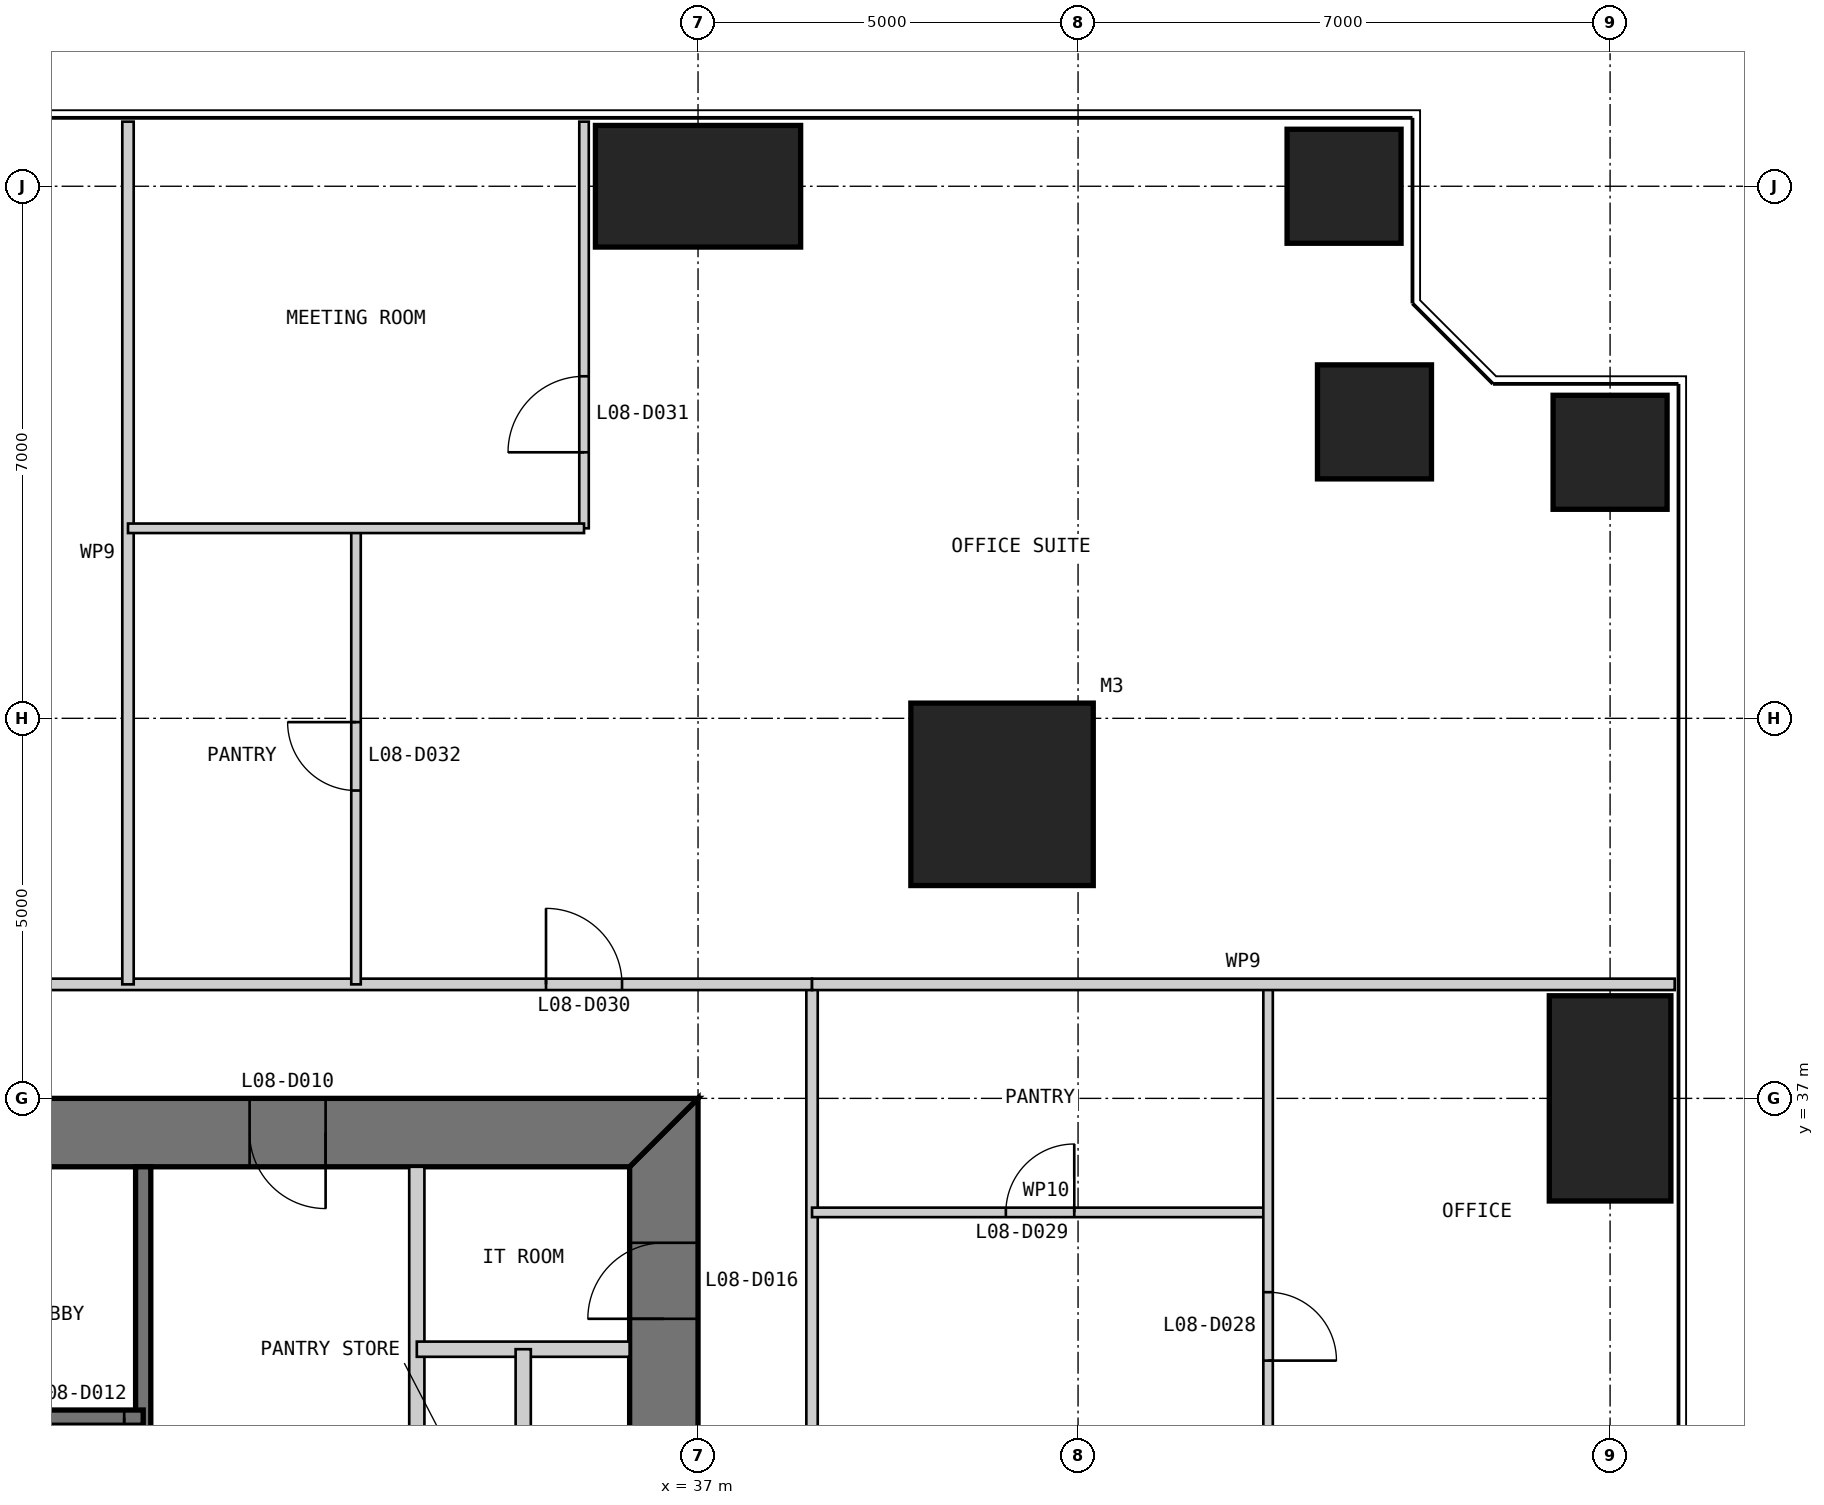
"""IFC4 building model, lengths in metres.
Left out: names, types, materials, properties, quantities, classifications, styles, units other than length and angle.
Written with IfcOpenShell. Run it as: python <this file> out.ifc"""

import sys

from ifc_helpers import new_model, si_unit, direction, frame, frame_2d, origin, origin_2d, place, context, subcontext, project, spatial, polyline, rectangle, outline, extrude, element, fill, save


model = new_model("IFC4")
c1 = context("Model", 3, precision=1e-05, world=origin(), true_north=direction((0.0, 1.0)))
c2 = subcontext(c1, "Body", "Model", "MODEL_VIEW")
j1 = project(units=[si_unit("LENGTHUNIT", "METRE"), si_unit("PLANEANGLEUNIT", "RADIAN")], contexts=[c1])
p1 = place(None, origin())
s1 = spatial("IfcSite", under=j1, at=p1, CompositionType="ELEMENT")
p2 = place(p1, origin())
s2 = spatial("IfcBuilding", under=s1, at=p2, CompositionType="ELEMENT")
p3 = place(p2, frame((0.0, 0.0, 39.0)))
s3 = spatial("IfcBuildingStorey", under=s2, at=p3, CompositionType="ELEMENT", Elevation=39.0)
p4 = place(p3, frame((41.0, 41.0, 0.0), z_axis=(0.0, 0.0, 1.0), x_axis=(1.0, 0.0, 0.0)))
e1 = element("IfcColumn", 1, at=p4, inside=s3, PredefinedType="COLUMN", context=c2, shape_type="SweptSolid", body=[
    extrude(rectangle(XDim=2.4, YDim=2.4, at=origin_2d()), origin(), (0.0, 0.0, 1.0), 4.0),
])
p5 = place(p3, frame((49.0, 37.0, 0.0), z_axis=(0.0, 0.0, 1.0), x_axis=(1.0, 0.0, 0.0)))
e2 = element("IfcColumn", 2, at=p5, inside=s3, PredefinedType="COLUMN", context=c2, shape_type="SweptSolid", body=[
    extrude(rectangle(XDim=1.6, YDim=2.7, at=origin_2d()), origin(), (0.0, 0.0, 1.0), 4.0),
])
for number, where, z_axis, x_axis in (
    (3, (49.0, 45.5, 0.0), (0.0, 0.0, 1.0), (1.0, 0.0, 0.0)),
    (4, (45.9, 45.9, 0.0), (0.0, 0.0, 1.0), (1.0, 0.0, 0.0)),
    (5, (45.5, 49.0, 0.0), (0.0, 0.0, 1.0), (1.0, 0.0, 0.0)),
):
    element("IfcColumn", number, at=place(p3, frame(where, z_axis=z_axis, x_axis=x_axis)), inside=s3, PredefinedType="COLUMN", context=c2, shape_type="SweptSolid", body=[
        extrude(rectangle(XDim=1.5, YDim=1.5, at=origin_2d()), origin(), (0.0, 0.0, 1.0), 4.0),
    ])
p6 = place(p3, frame((37.0, 49.0, 0.0), z_axis=(0.0, 0.0, 1.0), x_axis=(1.0, 0.0, 0.0)))
e6 = element("IfcColumn", 6, at=p6, inside=s3, PredefinedType="COLUMN", context=c2, shape_type="SweptSolid", body=[
    extrude(rectangle(XDim=2.7, YDim=1.6, at=origin_2d()), origin(), (0.0, 0.0, 1.0), 4.0),
])
p7 = place(p3, frame((36.55, 13.9, 0.0), z_axis=(0.0, 0.0, 1.0), x_axis=(0.0, 1.0, 0.0)))
e7 = element("IfcWall", 7, at=p7, inside=s3, PredefinedType="SHEAR", context=c2, shape_type="SweptSolid", body=[
    extrude(outline(polyline([(-0.9, -0.45), (23.1, -0.45), (22.2, 0.45), (0.0, 0.45), (-0.9, -0.45)])), origin(), (0.0, 0.0, 1.0), 4.0),
])
p8 = place(p7, frame((20.2, 0.0, 0.0)))
e8 = element("IfcOpeningElement", 8, at=p8, cuts=e7, PredefinedType="OPENING", context=c2, shape_type="SweptSolid", body=[
    extrude(rectangle(XDim=1.0, YDim=2.2, at=frame_2d((0.5, 1.1))), frame((0.0, 0.46, 0.0), z_axis=(0.0, -1.0, 0.0), x_axis=(1.0, 0.0, 0.0)), (0.0, 0.0, 1.0), 0.92),
])
p9 = place(p7, frame((17.25, 0.0, 0.0)))
e9 = element("IfcOpeningElement", 9, at=p9, cuts=e7, PredefinedType="OPENING", context=c2, shape_type="SweptSolid", body=[
    extrude(rectangle(XDim=0.9, YDim=2.2, at=frame_2d((0.45, 1.1))), frame((0.0, 0.46, 0.0), z_axis=(0.0, -1.0, 0.0), x_axis=(1.0, 0.0, 0.0)), (0.0, 0.0, 1.0), 0.92),
])
p10 = place(p3, frame((37.0, 36.55, 0.0), z_axis=(0.0, 0.0, 1.0), x_axis=(-1.0, 0.0, 0.0)))
e10 = element("IfcWall", 10, at=p10, inside=s3, PredefinedType="SHEAR", context=c2, shape_type="SweptSolid", body=[
    extrude(outline(polyline([(0.0, -0.45), (24.0, -0.45), (23.1, 0.45), (0.9, 0.45), (0.0, -0.45)])), origin(), (0.0, 0.0, 1.0), 4.0),
])
p11 = place(p10, frame((4.9, 0.0, 0.0)))
e11 = element("IfcOpeningElement", 11, at=p11, cuts=e10, PredefinedType="OPENING", context=c2, shape_type="SweptSolid", body=[
    extrude(rectangle(XDim=1.0, YDim=2.2, at=frame_2d((0.5, 1.1))), frame((0.0, 0.46, 0.0), z_axis=(0.0, -1.0, 0.0), x_axis=(1.0, 0.0, 0.0)), (0.0, 0.0, 1.0), 0.92),
])
p12 = place(p10, frame((8.9, 0.0, 0.0)))
e12 = element("IfcOpeningElement", 12, at=p12, cuts=e10, PredefinedType="OPENING", context=c2, shape_type="SweptSolid", body=[
    extrude(rectangle(XDim=1.1, YDim=2.2, at=frame_2d((0.55, 1.1))), frame((0.0, 0.46, 0.0), z_axis=(0.0, -1.0, 0.0), x_axis=(1.0, 0.0, 0.0)), (0.0, 0.0, 1.0), 0.92),
])
p13 = place(p10, frame((15.05, 0.0, 0.0)))
e13 = element("IfcOpeningElement", 13, at=p13, cuts=e10, PredefinedType="OPENING", context=c2, shape_type="SweptSolid", body=[
    extrude(rectangle(XDim=0.9, YDim=2.2, at=frame_2d((0.45, 1.1))), frame((0.0, 0.46, 0.0), z_axis=(0.0, -1.0, 0.0), x_axis=(1.0, 0.0, 0.0)), (0.0, 0.0, 1.0), 0.92),
])
p14 = place(p10, frame((17.9, 0.0, 0.0)))
e14 = element("IfcOpeningElement", 14, at=p14, cuts=e10, PredefinedType="OPENING", context=c2, shape_type="SweptSolid", body=[
    extrude(rectangle(XDim=1.0, YDim=2.2, at=frame_2d((0.5, 1.1))), frame((0.0, 0.46, 0.0), z_axis=(0.0, -1.0, 0.0), x_axis=(1.0, 0.0, 0.0)), (0.0, 0.0, 1.0), 0.92),
])
p15 = place(p10, frame((21.4, 0.0, 0.0)))
e15 = element("IfcOpeningElement", 15, at=p15, cuts=e10, PredefinedType="OPENING", context=c2, shape_type="SweptSolid", body=[
    extrude(rectangle(XDim=1.0, YDim=2.2, at=frame_2d((0.5, 1.1))), frame((0.0, 0.46, 0.0), z_axis=(0.0, -1.0, 0.0), x_axis=(1.0, 0.0, 0.0)), (0.0, 0.0, 1.0), 0.92),
])
p16 = place(p3, frame((33.3, 36.1, 0.0), z_axis=(0.0, 0.0, 1.0), x_axis=(0.0, -1.0, 0.0)))
e16 = element("IfcWall", 16, at=p16, inside=s3, PredefinedType="PARTITIONING", context=c2, shape_type="SweptSolid", body=[
    extrude(rectangle(XDim=16.1, YDim=0.2, at=frame_2d((8.05, 0.0))), origin(), (0.0, 0.0, 1.0), 3.8),
])
p17 = place(p16, frame((3.8, 0.0, 0.0)))
e17 = element("IfcOpeningElement", 17, at=p17, cuts=e16, PredefinedType="OPENING", context=c2, shape_type="SweptSolid", body=[
    extrude(rectangle(XDim=0.9, YDim=2.2, at=frame_2d((0.45, 1.1))), frame((0.0, 0.11, 0.0), z_axis=(0.0, -1.0, 0.0), x_axis=(1.0, 0.0, 0.0)), (0.0, 0.0, 1.0), 0.22),
])
p18 = place(p3, frame((29.7, 36.1, 0.0), z_axis=(0.0, 0.0, 1.0), x_axis=(0.0, -1.0, 0.0)))
e18 = element("IfcWall", 18, at=p18, inside=s3, PredefinedType="SOLIDWALL", context=c2, shape_type="SweptSolid", body=[
    extrude(rectangle(XDim=16.1, YDim=0.2, at=frame_2d((8.05, 0.0))), origin(), (0.0, 0.0, 1.0), 3.8),
])
p19 = place(p3, frame((29.7, 32.8, 0.0), z_axis=(0.0, 0.0, 1.0), x_axis=(-1.0, 0.0, 0.0)))
e19 = element("IfcWall", 19, at=p19, inside=s3, PredefinedType="SOLIDWALL", context=c2, shape_type="SweptSolid", body=[
    extrude(rectangle(XDim=9.4, YDim=0.2, at=frame_2d((4.7, 0.0))), origin(), (0.0, 0.0, 1.0), 3.8),
])
p20 = place(p19, frame((0.25, 0.0, 0.0)))
e20 = element("IfcOpeningElement", 20, at=p20, cuts=e19, PredefinedType="OPENING", context=c2, shape_type="SweptSolid", body=[
    extrude(rectangle(XDim=1.0, YDim=2.2, at=frame_2d((0.5, 1.1))), frame((0.0, 0.11, 0.0), z_axis=(0.0, -1.0, 0.0), x_axis=(1.0, 0.0, 0.0)), (0.0, 0.0, 1.0), 0.22),
])
p21 = place(p3, frame((36.1, 33.7, 0.0), z_axis=(0.0, 0.0, 1.0), x_axis=(-1.0, 0.0, 0.0)))
e21 = element("IfcWall", 21, at=p21, inside=s3, PredefinedType="PARTITIONING", context=c2, shape_type="SweptSolid", body=[
    extrude(rectangle(XDim=2.8, YDim=0.2, at=frame_2d((1.4, 0.0))), origin(), (0.0, 0.0, 1.0), 3.8),
])
p22 = place(p3, frame((34.7, 33.7, 0.0), z_axis=(0.0, 0.0, 1.0), x_axis=(0.0, -1.0, 0.0)))
e22 = element("IfcWall", 22, at=p22, inside=s3, PredefinedType="PARTITIONING", context=c2, shape_type="SweptSolid", body=[
    extrude(rectangle(XDim=3.7, YDim=0.2, at=frame_2d((1.85, 0.0))), origin(), (0.0, 0.0, 1.0), 3.8),
])
p23 = place(p3, frame((38.5, 11.5, 0.0), z_axis=(0.0, 0.0, 1.0), x_axis=(0.0, 1.0, 0.0)))
e23 = element("IfcWall", 23, at=p23, inside=s3, PredefinedType="PARTITIONING", context=c2, shape_type="SweptSolid", body=[
    extrude(rectangle(XDim=27.0, YDim=0.15, at=frame_2d((13.5, 0.0))), origin(), (0.0, 0.0, 1.0), 3.85),
])
p24 = place(p23, frame((11.5, 0.0, 0.0)))
e24 = element("IfcOpeningElement", 24, at=p24, cuts=e23, PredefinedType="OPENING", context=c2, shape_type="SweptSolid", body=[
    extrude(rectangle(XDim=1.0, YDim=2.2, at=frame_2d((0.5, 1.1))), frame((0.0, 0.085, 0.0), z_axis=(0.0, -1.0, 0.0), x_axis=(1.0, 0.0, 0.0)), (0.0, 0.0, 1.0), 0.17),
])
p25 = place(p3, frame((44.5, 35.5, 0.0), z_axis=(0.0, 0.0, 1.0), x_axis=(-1.0, 0.0, 0.0)))
e25 = element("IfcWall", 25, at=p25, inside=s3, PredefinedType="PARTITIONING", context=c2, shape_type="SweptSolid", body=[
    extrude(rectangle(XDim=6.0, YDim=0.125, at=frame_2d((3.0, 0.0))), origin(), (0.0, 0.0, 1.0), 3.85),
])
p26 = place(p25, frame((2.55, 0.0, 0.0)))
e26 = element("IfcOpeningElement", 26, at=p26, cuts=e25, PredefinedType="OPENING", context=c2, shape_type="SweptSolid", body=[
    extrude(rectangle(XDim=0.9, YDim=2.2, at=frame_2d((0.45, 1.1))), frame((0.0, 0.073, 0.0), z_axis=(0.0, -1.0, 0.0), x_axis=(1.0, 0.0, 0.0)), (0.0, 0.0, 1.0), 0.145),
])
p27 = place(p3, frame((44.5, 14.5, 0.0), z_axis=(0.0, 0.0, 1.0), x_axis=(0.0, 1.0, 0.0)))
e27 = element("IfcWall", 27, at=p27, inside=s3, PredefinedType="PARTITIONING", context=c2, shape_type="SweptSolid", body=[
    extrude(rectangle(XDim=24.0, YDim=0.125, at=frame_2d((12.0, 0.0))), origin(), (0.0, 0.0, 1.0), 3.85),
])
p28 = place(p27, frame((10.05, 0.0, 0.0)))
e28 = element("IfcOpeningElement", 28, at=p28, cuts=e27, PredefinedType="OPENING", context=c2, shape_type="SweptSolid", body=[
    extrude(rectangle(XDim=0.9, YDim=2.2, at=frame_2d((0.45, 1.1))), frame((0.0, 0.073, 0.0), z_axis=(0.0, -1.0, 0.0), x_axis=(1.0, 0.0, 0.0)), (0.0, 0.0, 1.0), 0.145),
])
p29 = place(p27, frame((16.05, 0.0, 0.0)))
e29 = element("IfcOpeningElement", 29, at=p29, cuts=e27, PredefinedType="OPENING", context=c2, shape_type="SweptSolid", body=[
    extrude(rectangle(XDim=0.9, YDim=2.2, at=frame_2d((0.45, 1.1))), frame((0.0, 0.073, 0.0), z_axis=(0.0, -1.0, 0.0), x_axis=(1.0, 0.0, 0.0)), (0.0, 0.0, 1.0), 0.145),
])
p30 = place(p27, frame((19.05, 0.0, 0.0)))
e30 = element("IfcOpeningElement", 30, at=p30, cuts=e27, PredefinedType="OPENING", context=c2, shape_type="SweptSolid", body=[
    extrude(rectangle(XDim=0.9, YDim=2.2, at=frame_2d((0.45, 1.1))), frame((0.0, 0.073, 0.0), z_axis=(0.0, -1.0, 0.0), x_axis=(1.0, 0.0, 0.0)), (0.0, 0.0, 1.0), 0.145),
])
p31 = place(p3, frame((38.5, 38.5, 0.0), z_axis=(0.0, 0.0, 1.0), x_axis=(-1.0, 0.0, 0.0)))
e31 = element("IfcWall", 31, at=p31, inside=s3, PredefinedType="PARTITIONING", context=c2, shape_type="SweptSolid", body=[
    extrude(rectangle(XDim=27.0, YDim=0.15, at=frame_2d((13.5, 0.0))), origin(), (0.0, 0.0, 1.0), 3.85),
])
p32 = place(p31, frame((2.5, 0.0, 0.0)))
e32 = element("IfcOpeningElement", 32, at=p32, cuts=e31, PredefinedType="OPENING", context=c2, shape_type="SweptSolid", body=[
    extrude(rectangle(XDim=1.0, YDim=2.2, at=frame_2d((0.5, 1.1))), frame((0.0, 0.085, 0.0), z_axis=(0.0, -1.0, 0.0), x_axis=(1.0, 0.0, 0.0)), (0.0, 0.0, 1.0), 0.17),
])
p33 = place(p31, frame((13.0, 0.0, 0.0)))
e33 = element("IfcOpeningElement", 33, at=p33, cuts=e31, PredefinedType="OPENING", context=c2, shape_type="SweptSolid", body=[
    extrude(rectangle(XDim=1.0, YDim=2.2, at=frame_2d((0.5, 1.1))), frame((0.0, 0.085, 0.0), z_axis=(0.0, -1.0, 0.0), x_axis=(1.0, 0.0, 0.0)), (0.0, 0.0, 1.0), 0.17),
])
p34 = place(p31, frame((23.5, 0.0, 0.0)))
e34 = element("IfcOpeningElement", 34, at=p34, cuts=e31, PredefinedType="OPENING", context=c2, shape_type="SweptSolid", body=[
    extrude(rectangle(XDim=1.0, YDim=2.2, at=frame_2d((0.5, 1.1))), frame((0.0, 0.085, 0.0), z_axis=(0.0, -1.0, 0.0), x_axis=(1.0, 0.0, 0.0)), (0.0, 0.0, 1.0), 0.17),
])
p35 = place(p3, frame((49.85, 38.5, 0.0), z_axis=(0.0, 0.0, 1.0), x_axis=(-1.0, 0.0, 0.0)))
e35 = element("IfcWall", 35, at=p35, inside=s3, PredefinedType="PARTITIONING", context=c2, shape_type="SweptSolid", body=[
    extrude(rectangle(XDim=11.35, YDim=0.15, at=frame_2d((5.675, 0.0))), origin(), (0.0, 0.0, 1.0), 3.85),
])
p36 = place(p3, frame((35.5, 49.85, 0.0), z_axis=(0.0, 0.0, 1.0), x_axis=(0.0, -1.0, 0.0)))
e36 = element("IfcWall", 36, at=p36, inside=s3, PredefinedType="PARTITIONING", context=c2, shape_type="SweptSolid", body=[
    extrude(rectangle(XDim=5.35, YDim=0.125, at=frame_2d((2.675, 0.0))), origin(), (0.0, 0.0, 1.0), 3.85),
])
p37 = place(p36, frame((3.35, 0.0, 0.0)))
e37 = element("IfcOpeningElement", 37, at=p37, cuts=e36, PredefinedType="OPENING", context=c2, shape_type="SweptSolid", body=[
    extrude(rectangle(XDim=1.0, YDim=2.2, at=frame_2d((0.5, 1.1))), frame((0.0, 0.073, 0.0), z_axis=(0.0, -1.0, 0.0), x_axis=(1.0, 0.0, 0.0)), (0.0, 0.0, 1.0), 0.145),
])
p38 = place(p3, frame((32.5, 44.5, 0.0), z_axis=(0.0, 0.0, 1.0), x_axis=(0.0, -1.0, 0.0)))
e38 = element("IfcWall", 38, at=p38, inside=s3, PredefinedType="PARTITIONING", context=c2, shape_type="SweptSolid", body=[
    extrude(rectangle(XDim=6.0, YDim=0.125, at=frame_2d((3.0, 0.0))), origin(), (0.0, 0.0, 1.0), 3.85),
])
p39 = place(p38, frame((2.55, 0.0, 0.0)))
e39 = element("IfcOpeningElement", 39, at=p39, cuts=e38, PredefinedType="OPENING", context=c2, shape_type="SweptSolid", body=[
    extrude(rectangle(XDim=0.9, YDim=2.2, at=frame_2d((0.45, 1.1))), frame((0.0, 0.073, 0.0), z_axis=(0.0, -1.0, 0.0), x_axis=(1.0, 0.0, 0.0)), (0.0, 0.0, 1.0), 0.145),
])
p40 = place(p3, frame((29.5, 49.85, 0.0), z_axis=(0.0, 0.0, 1.0), x_axis=(0.0, -1.0, 0.0)))
e40 = element("IfcWall", 40, at=p40, inside=s3, PredefinedType="PARTITIONING", context=c2, shape_type="SweptSolid", body=[
    extrude(rectangle(XDim=11.35, YDim=0.15, at=frame_2d((5.675, 0.0))), origin(), (0.0, 0.0, 1.0), 3.85),
])
p41 = place(p3, frame((35.5, 44.5, 0.0), z_axis=(0.0, 0.0, 1.0), x_axis=(-1.0, 0.0, 0.0)))
e41 = element("IfcWall", 41, at=p41, inside=s3, PredefinedType="PARTITIONING", context=c2, shape_type="SweptSolid", body=[
    extrude(rectangle(XDim=6.0, YDim=0.125, at=frame_2d((3.0, 0.0))), origin(), (0.0, 0.0, 1.0), 3.85),
])
p42 = place(p11, origin())
e42 = element("IfcDoor", 42, at=p42, inside=s3, OperationType="SINGLE_SWING_LEFT", PredefinedType="DOOR", context=c2, shape_type="SweptSolid", body=[
    extrude(rectangle(XDim=1.0, YDim=2.2, at=frame_2d((0.5, 1.1))), frame((0.0, 0.025, 0.0), z_axis=(0.0, -1.0, 0.0), x_axis=(1.0, 0.0, 0.0)), (0.0, 0.0, 1.0), 0.05),
    extrude(outline(polyline([(0.0, 0.0), (0.04, 0.0), (0.04, 2.16), (0.96, 2.16), (0.96, 0.0), (1.0, 0.0), (1.0, 2.2), (0.0, 2.2), (0.0, 0.0)])), frame((0.0, 0.3, 0.0), z_axis=(0.0, -1.0, 0.0), x_axis=(1.0, 0.0, 0.0)), (0.0, 0.0, 1.0), 0.6),
])
fill(e11, e42)
p43 = place(p20, origin())
e43 = element("IfcDoor", 43, at=p43, inside=s3, OperationType="SINGLE_SWING_LEFT", PredefinedType="DOOR", context=c2, shape_type="SweptSolid", body=[
    extrude(rectangle(XDim=1.0, YDim=2.2, at=frame_2d((0.5, 1.1))), frame((0.0, 0.025, 0.0), z_axis=(0.0, -1.0, 0.0), x_axis=(1.0, 0.0, 0.0)), (0.0, 0.0, 1.0), 0.05),
])
fill(e20, e43)
p44 = place(p8, origin())
e44 = element("IfcDoor", 44, at=p44, inside=s3, OperationType="SINGLE_SWING_LEFT", PredefinedType="DOOR", context=c2, shape_type="SweptSolid", body=[
    extrude(rectangle(XDim=1.0, YDim=2.2, at=frame_2d((0.5, 1.1))), frame((0.0, 0.025, 0.0), z_axis=(0.0, -1.0, 0.0), x_axis=(1.0, 0.0, 0.0)), (0.0, 0.0, 1.0), 0.05),
    extrude(outline(polyline([(0.0, 0.0), (0.04, 0.0), (0.04, 2.16), (0.96, 2.16), (0.96, 0.0), (1.0, 0.0), (1.0, 2.2), (0.0, 2.2), (0.0, 0.0)])), frame((0.0, 0.3, 0.0), z_axis=(0.0, -1.0, 0.0), x_axis=(1.0, 0.0, 0.0)), (0.0, 0.0, 1.0), 0.6),
])
fill(e8, e44)
p45 = place(p30, frame((0.9, 0.0, 0.0), z_axis=(0.0, 0.0, 1.0), x_axis=(-1.0, 0.0, 0.0)))
e45 = element("IfcDoor", 45, at=p45, inside=s3, OperationType="SINGLE_SWING_RIGHT", PredefinedType="DOOR", context=c2, shape_type="SweptSolid", body=[
    extrude(rectangle(XDim=0.9, YDim=2.2, at=frame_2d((0.45, 1.1))), frame((0.0, 0.025, 0.0), z_axis=(0.0, -1.0, 0.0), x_axis=(1.0, 0.0, 0.0)), (0.0, 0.0, 1.0), 0.05),
])
fill(e30, e45)
p46 = place(p26, frame((0.9, 0.0, 0.0), z_axis=(0.0, 0.0, 1.0), x_axis=(-1.0, 0.0, 0.0)))
e46 = element("IfcDoor", 46, at=p46, inside=s3, OperationType="SINGLE_SWING_RIGHT", PredefinedType="DOOR", context=c2, shape_type="SweptSolid", body=[
    extrude(rectangle(XDim=0.9, YDim=2.2, at=frame_2d((0.45, 1.1))), frame((0.0, 0.025, 0.0), z_axis=(0.0, -1.0, 0.0), x_axis=(1.0, 0.0, 0.0)), (0.0, 0.0, 1.0), 0.05),
])
fill(e26, e46)
p47 = place(p32, frame((1.0, 0.0, 0.0), z_axis=(0.0, 0.0, 1.0), x_axis=(-1.0, 0.0, 0.0)))
e47 = element("IfcDoor", 47, at=p47, inside=s3, OperationType="SINGLE_SWING_LEFT", PredefinedType="DOOR", context=c2, shape_type="SweptSolid", body=[
    extrude(rectangle(XDim=1.0, YDim=2.2, at=frame_2d((0.5, 1.1))), frame((0.0, 0.025, 0.0), z_axis=(0.0, -1.0, 0.0), x_axis=(1.0, 0.0, 0.0)), (0.0, 0.0, 1.0), 0.05),
])
fill(e32, e47)
p48 = place(p37, frame((1.0, 0.0, 0.0), z_axis=(0.0, 0.0, 1.0), x_axis=(-1.0, 0.0, 0.0)))
e48 = element("IfcDoor", 48, at=p48, inside=s3, OperationType="SINGLE_SWING_LEFT", PredefinedType="DOOR", context=c2, shape_type="SweptSolid", body=[
    extrude(rectangle(XDim=1.0, YDim=2.2, at=frame_2d((0.5, 1.1))), frame((0.0, 0.025, 0.0), z_axis=(0.0, -1.0, 0.0), x_axis=(1.0, 0.0, 0.0)), (0.0, 0.0, 1.0), 0.05),
])
fill(e37, e48)
p49 = place(p39, frame((0.9, 0.0, 0.0), z_axis=(0.0, 0.0, 1.0), x_axis=(-1.0, 0.0, 0.0)))
e49 = element("IfcDoor", 49, at=p49, inside=s3, OperationType="SINGLE_SWING_RIGHT", PredefinedType="DOOR", context=c2, shape_type="SweptSolid", body=[
    extrude(rectangle(XDim=0.9, YDim=2.2, at=frame_2d((0.45, 1.1))), frame((0.0, 0.025, 0.0), z_axis=(0.0, -1.0, 0.0), x_axis=(1.0, 0.0, 0.0)), (0.0, 0.0, 1.0), 0.05),
])
fill(e39, e49)
save(model, sys.argv[1])
